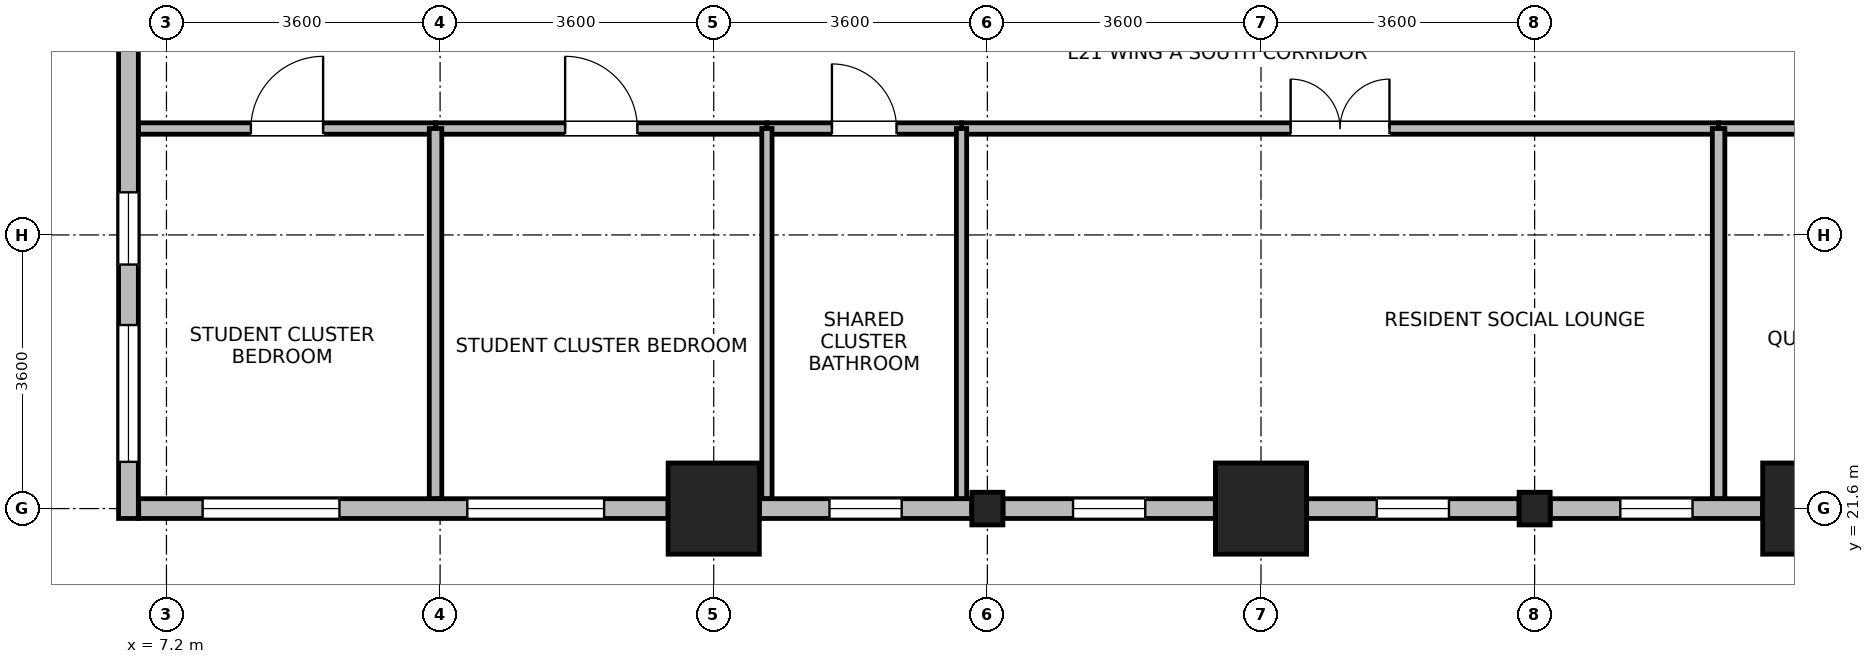
"""IFC4 building model, lengths in metres.
Left out: names, types, materials, properties, quantities, classifications, styles, units other than length and angle.
Written with IfcOpenShell. Run it as: python <this file> out.ifc"""

import sys

from ifc_helpers import new_model, si_unit, direction, frame, frame_2d, origin, origin_2d, place, context, subcontext, project, spatial, rectangle, i_section, extrude, source, transform, mapped, element, fill, save


model = new_model("IFC4")
c1 = context("Model", 3, precision=1e-05, world=origin(), true_north=direction((0.0, 1.0)))
c2 = subcontext(c1, "Body", "Model", "MODEL_VIEW")
j1 = project(units=[si_unit("LENGTHUNIT", "METRE"), si_unit("PLANEANGLEUNIT", "RADIAN")], contexts=[c1])
p1 = place(None, origin())
s1 = spatial("IfcSite", under=j1, at=p1, CompositionType="ELEMENT")
p2 = place(p1, origin())
s2 = spatial("IfcBuilding", under=s1, at=p2, CompositionType="ELEMENT")
p3 = place(p2, frame((0.0, 0.0, 86.0)))
s3 = spatial("IfcBuildingStorey", under=s2, at=p3, CompositionType="ELEMENT", Elevation=86.0)
m1 = source(origin(), c2, "Body", "SweptSolid", [
    extrude(rectangle(XDim=1.2, YDim=1.2, at=origin_2d()), origin(), (0.0, 0.0, 1.0), 3.7),
])
for number, where, z_axis, x_axis in (
    (1, (14.4, 21.6, 0.0), (0.0, 0.0, 1.0), (1.0, 0.0, 0.0)),
    (2, (21.6, 21.6, 0.0), (0.0, 0.0, 1.0), (1.0, 0.0, 0.0)),
    (3, (28.8, 21.6, 0.0), (0.0, 0.0, 1.0), (1.0, 0.0, 0.0)),
):
    element("IfcColumn", number, at=place(p3, frame(where, z_axis=z_axis, x_axis=x_axis)), inside=s3, PredefinedType="COLUMN", context=c2, shape_type="MappedRepresentation", body=[
        mapped(m1, transform((0.0, 0.0, 0.0), x_axis=(1.0, 0.0, 0.0), y_axis=(0.0, 1.0, 0.0), z_axis=(0.0, 0.0, 1.0), scale=1.0)),
    ])
m2 = source(origin(), c2, "Body", "SweptSolid", [
    extrude(i_section(OverallWidth=0.409, OverallDepth=0.43, WebThickness=0.024, FlangeThickness=0.033, FilletRadius=0.015, at=origin_2d()), origin(), (0.0, 0.0, 1.0), 3.7),
])
for number, where, z_axis, x_axis in (
    (4, (18.0, 21.6, 0.0), (0.0, 0.0, 1.0), (1.0, 0.0, 0.0)),
    (5, (25.2, 21.6, 0.0), (0.0, 0.0, 1.0), (1.0, 0.0, 0.0)),
):
    element("IfcColumn", number, at=place(p3, frame(where, z_axis=z_axis, x_axis=x_axis)), inside=s3, PredefinedType="COLUMN", context=c2, shape_type="MappedRepresentation", body=[
        mapped(m2, transform((0.0, 0.0, 0.0), x_axis=(1.0, 0.0, 0.0), y_axis=(0.0, 1.0, 0.0), z_axis=(0.0, 0.0, 1.0), scale=1.0)),
    ])
p4 = place(p3, frame((6.7, 21.47, 0.0), z_axis=(0.0, 0.0, 1.0), x_axis=(0.0, 1.0, 0.0)))
e6 = element("IfcWall", 6, at=p4, inside=s3, PredefinedType="STANDARD", context=c2, shape_type="SweptSolid", body=[
    extrude(rectangle(XDim=6.579, YDim=0.26, at=frame_2d((3.29, 0.0))), origin(), (0.0, 0.0, 1.0), 3.43),
])
p5 = place(p4, frame((0.745, 0.0, 0.85)))
e7 = element("IfcOpeningElement", 7, at=p5, cuts=e6, PredefinedType="OPENING", context=c2, shape_type="SweptSolid", body=[
    extrude(rectangle(XDim=1.8, YDim=1.85, at=frame_2d((0.9, 0.925))), frame((0.0, 0.14, 0.0), z_axis=(0.0, -1.0, 0.0), x_axis=(1.0, 0.0, 0.0)), (0.0, 0.0, 1.0), 0.28),
])
p6 = place(p4, frame((3.341, 0.0, 0.85)))
e8 = element("IfcOpeningElement", 8, at=p6, cuts=e6, PredefinedType="OPENING", context=c2, shape_type="SweptSolid", body=[
    extrude(rectangle(XDim=0.95, YDim=1.75, at=frame_2d((0.475, 0.875))), frame((0.0, 0.14, 0.0), z_axis=(0.0, -1.0, 0.0), x_axis=(1.0, 0.0, 0.0)), (0.0, 0.0, 1.0), 0.28),
])
p7 = place(p3, frame((13.799, 21.6, 0.0), z_axis=(0.0, 0.0, 1.0), x_axis=(-1.0, 0.0, 0.0)))
e9 = element("IfcWall", 9, at=p7, inside=s3, PredefinedType="STANDARD", context=c2, shape_type="SweptSolid", body=[
    extrude(rectangle(XDim=6.964, YDim=0.26, at=frame_2d((3.482, 0.0))), origin(), (0.0, 0.0, 1.0), 3.43),
])
p8 = place(p7, frame((0.841, 0.0, 0.85)))
e10 = element("IfcOpeningElement", 10, at=p8, cuts=e9, PredefinedType="OPENING", context=c2, shape_type="SweptSolid", body=[
    extrude(rectangle(XDim=1.8, YDim=1.85, at=frame_2d((0.9, 0.925))), frame((0.0, 0.14, 0.0), z_axis=(0.0, -1.0, 0.0), x_axis=(1.0, 0.0, 0.0)), (0.0, 0.0, 1.0), 0.28),
])
p9 = place(p7, frame((4.323, 0.0, 0.85)))
e11 = element("IfcOpeningElement", 11, at=p9, cuts=e9, PredefinedType="OPENING", context=c2, shape_type="SweptSolid", body=[
    extrude(rectangle(XDim=1.8, YDim=1.85, at=frame_2d((0.9, 0.925))), frame((0.0, 0.14, 0.0), z_axis=(0.0, -1.0, 0.0), x_axis=(1.0, 0.0, 0.0)), (0.0, 0.0, 1.0), 0.28),
])
p10 = place(p3, frame((17.794, 21.6, 0.0), z_axis=(0.0, 0.0, 1.0), x_axis=(-1.0, 0.0, 0.0)))
e12 = element("IfcWall", 12, at=p10, inside=s3, PredefinedType="STANDARD", context=c2, shape_type="SweptSolid", body=[
    extrude(rectangle(XDim=2.793, YDim=0.26, at=frame_2d((1.397, 0.0))), origin(), (0.0, 0.0, 1.0), 2.93),
])
p11 = place(p10, frame((0.922, 0.0, 0.85)))
e13 = element("IfcOpeningElement", 13, at=p11, cuts=e12, PredefinedType="OPENING", context=c2, shape_type="SweptSolid", body=[
    extrude(rectangle(XDim=0.95, YDim=1.75, at=frame_2d((0.475, 0.875))), frame((0.0, 0.14, 0.0), z_axis=(0.0, -1.0, 0.0), x_axis=(1.0, 0.0, 0.0)), (0.0, 0.0, 1.0), 0.28),
])
p12 = place(p3, frame((20.999, 21.6, 0.0), z_axis=(0.0, 0.0, 1.0), x_axis=(-1.0, 0.0, 0.0)))
e14 = element("IfcWall", 14, at=p12, inside=s3, PredefinedType="STANDARD", context=c2, shape_type="SweptSolid", body=[
    extrude(rectangle(XDim=2.793, YDim=0.26, at=frame_2d((1.397, 0.0))), origin(), (0.0, 0.0, 1.0), 2.93),
])
p13 = place(p12, frame((0.922, 0.0, 0.85)))
e15 = element("IfcOpeningElement", 15, at=p13, cuts=e14, PredefinedType="OPENING", context=c2, shape_type="SweptSolid", body=[
    extrude(rectangle(XDim=0.95, YDim=1.75, at=frame_2d((0.475, 0.875))), frame((0.0, 0.14, 0.0), z_axis=(0.0, -1.0, 0.0), x_axis=(1.0, 0.0, 0.0)), (0.0, 0.0, 1.0), 0.28),
])
p14 = place(p3, frame((24.994, 21.6, 0.0), z_axis=(0.0, 0.0, 1.0), x_axis=(-1.0, 0.0, 0.0)))
e16 = element("IfcWall", 16, at=p14, inside=s3, PredefinedType="STANDARD", context=c2, shape_type="SweptSolid", body=[
    extrude(rectangle(XDim=2.793, YDim=0.26, at=frame_2d((1.397, 0.0))), origin(), (0.0, 0.0, 1.0), 2.93),
])
p15 = place(p14, frame((0.922, 0.0, 0.85)))
e17 = element("IfcOpeningElement", 17, at=p15, cuts=e16, PredefinedType="OPENING", context=c2, shape_type="SweptSolid", body=[
    extrude(rectangle(XDim=0.95, YDim=1.75, at=frame_2d((0.475, 0.875))), frame((0.0, 0.14, 0.0), z_axis=(0.0, -1.0, 0.0), x_axis=(1.0, 0.0, 0.0)), (0.0, 0.0, 1.0), 0.28),
])
p16 = place(p3, frame((28.199, 21.6, 0.0), z_axis=(0.0, 0.0, 1.0), x_axis=(-1.0, 0.0, 0.0)))
e18 = element("IfcWall", 18, at=p16, inside=s3, PredefinedType="STANDARD", context=c2, shape_type="SweptSolid", body=[
    extrude(rectangle(XDim=2.793, YDim=0.26, at=frame_2d((1.397, 0.0))), origin(), (0.0, 0.0, 1.0), 2.93),
])
p17 = place(p16, frame((0.922, 0.0, 0.85)))
e19 = element("IfcOpeningElement", 19, at=p17, cuts=e18, PredefinedType="OPENING", context=c2, shape_type="SweptSolid", body=[
    extrude(rectangle(XDim=0.95, YDim=1.75, at=frame_2d((0.475, 0.875))), frame((0.0, 0.14, 0.0), z_axis=(0.0, -1.0, 0.0), x_axis=(1.0, 0.0, 0.0)), (0.0, 0.0, 1.0), 0.28),
])
p18 = place(p3, frame((17.66, 26.6, 0.0), z_axis=(0.0, 0.0, 1.0), x_axis=(1.0, 0.0, 0.0)))
e20 = element("IfcWall", 20, at=p18, inside=s3, PredefinedType="PARTITIONING", context=c2, shape_type="SweptSolid", body=[
    extrude(rectangle(XDim=9.96, YDim=0.15, at=frame_2d((4.98, 0.0))), origin(), (0.0, 0.0, 1.0), 3.43),
])
p19 = place(p18, frame((4.33, 0.0, 0.0)))
e21 = element("IfcOpeningElement", 21, at=p19, cuts=e20, PredefinedType="OPENING", context=c2, shape_type="SweptSolid", body=[
    extrude(rectangle(XDim=1.3, YDim=2.12, at=frame_2d((0.65, 1.06))), frame((0.0, 0.085, 0.0), z_axis=(0.0, -1.0, 0.0), x_axis=(1.0, 0.0, 0.0)), (0.0, 0.0, 1.0), 0.17),
])
p20 = place(p3, frame((27.62, 26.6, 0.0), z_axis=(0.0, 0.0, 1.0), x_axis=(1.0, 0.0, 0.0)))
e22 = element("IfcWall", 22, at=p20, inside=s3, PredefinedType="PARTITIONING", context=c2, shape_type="SweptSolid", body=[
    extrude(rectangle(XDim=5.74, YDim=0.15, at=frame_2d((2.87, 0.0))), origin(), (0.0, 0.0, 1.0), 3.43),
])
p21 = place(p20, frame((2.22, 0.0, 0.0)))
e23 = element("IfcOpeningElement", 23, at=p21, cuts=e22, PredefinedType="OPENING", context=c2, shape_type="SweptSolid", body=[
    extrude(rectangle(XDim=1.3, YDim=2.12, at=frame_2d((0.65, 1.06))), frame((0.0, 0.085, 0.0), z_axis=(0.0, -1.0, 0.0), x_axis=(1.0, 0.0, 0.0)), (0.0, 0.0, 1.0), 0.17),
])
p22 = place(p3, frame((10.74, 26.6, 0.0), z_axis=(0.0, 0.0, 1.0), x_axis=(1.0, 0.0, 0.0)))
e24 = element("IfcWall", 24, at=p22, inside=s3, PredefinedType="PARTITIONING", context=c2, shape_type="SweptSolid", body=[
    extrude(rectangle(XDim=4.36, YDim=0.15, at=frame_2d((2.18, 0.0))), origin(), (0.0, 0.0, 1.0), 3.43),
])
p23 = place(p22, frame((1.705, 0.0, 0.0)))
e25 = element("IfcOpeningElement", 25, at=p23, cuts=e24, PredefinedType="OPENING", context=c2, shape_type="SweptSolid", body=[
    extrude(rectangle(XDim=0.95, YDim=2.1, at=frame_2d((0.475, 1.05))), frame((0.0, 0.085, 0.0), z_axis=(0.0, -1.0, 0.0), x_axis=(1.0, 0.0, 0.0)), (0.0, 0.0, 1.0), 0.17),
])
p24 = place(p3, frame((6.832, 26.6, 0.0), z_axis=(0.0, 0.0, 1.0), x_axis=(1.0, 0.0, 0.0)))
e26 = element("IfcWall", 26, at=p24, inside=s3, PredefinedType="PARTITIONING", context=c2, shape_type="SweptSolid", body=[
    extrude(rectangle(XDim=3.908, YDim=0.15, at=frame_2d((1.954, 0.0))), origin(), (0.0, 0.0, 1.0), 3.43),
])
p25 = place(p24, frame((1.479, 0.0, 0.0)))
e27 = element("IfcOpeningElement", 27, at=p25, cuts=e26, PredefinedType="OPENING", context=c2, shape_type="SweptSolid", body=[
    extrude(rectangle(XDim=0.95, YDim=2.1, at=frame_2d((0.475, 1.05))), frame((0.0, 0.085, 0.0), z_axis=(0.0, -1.0, 0.0), x_axis=(1.0, 0.0, 0.0)), (0.0, 0.0, 1.0), 0.17),
])
p26 = place(p3, frame((15.1, 26.6, 0.0), z_axis=(0.0, 0.0, 1.0), x_axis=(1.0, 0.0, 0.0)))
e28 = element("IfcWall", 28, at=p26, inside=s3, PredefinedType="PARTITIONING", context=c2, shape_type="SweptSolid", body=[
    extrude(rectangle(XDim=2.56, YDim=0.15, at=frame_2d((1.28, 0.0))), origin(), (0.0, 0.0, 1.0), 3.43),
])
p27 = place(p26, frame((0.855, 0.0, 0.0)))
e29 = element("IfcOpeningElement", 29, at=p27, cuts=e28, PredefinedType="OPENING", context=c2, shape_type="SweptSolid", body=[
    extrude(rectangle(XDim=0.85, YDim=2.04, at=frame_2d((0.425, 1.02))), frame((0.0, 0.085, 0.0), z_axis=(0.0, -1.0, 0.0), x_axis=(1.0, 0.0, 0.0)), (0.0, 0.0, 1.0), 0.17),
])
p28 = place(p3, frame((10.74, 21.732, 0.0), z_axis=(0.0, 0.0, 1.0), x_axis=(0.0, 1.0, 0.0)))
e30 = element("IfcWall", 30, at=p28, inside=s3, PredefinedType="PARTITIONING", context=c2, shape_type="SweptSolid", body=[
    extrude(rectangle(XDim=4.868, YDim=0.165, at=frame_2d((2.434, 0.0))), origin(), (0.0, 0.0, 1.0), 3.43),
])
for number, where, z_axis, x_axis in (
    (31, (15.1, 21.732, 0.0), (0.0, 0.0, 1.0), (0.0, 1.0, 0.0)),
    (32, (17.66, 21.732, 0.0), (0.0, 0.0, 1.0), (0.0, 1.0, 0.0)),
):
    element("IfcWall", number, at=place(p3, frame(where, z_axis=z_axis, x_axis=x_axis)), inside=s3, PredefinedType="PARTITIONING", context=c2, shape_type="SweptSolid", body=[
        extrude(rectangle(XDim=4.868, YDim=0.135, at=frame_2d((2.434, 0.0))), origin(), (0.0, 0.0, 1.0), 3.43),
    ])
p29 = place(p3, frame((27.62, 21.732, 0.0), z_axis=(0.0, 0.0, 1.0), x_axis=(0.0, 1.0, 0.0)))
e33 = element("IfcWall", 33, at=p29, inside=s3, PredefinedType="PARTITIONING", context=c2, shape_type="SweptSolid", body=[
    extrude(rectangle(XDim=4.868, YDim=0.165, at=frame_2d((2.434, 0.0))), origin(), (0.0, 0.0, 1.0), 3.43),
])
p30 = place(p5, origin())
e34 = element("IfcWindow", 34, at=p30, inside=s3, PartitioningType="SINGLE_PANEL", PredefinedType="WINDOW", context=c2, shape_type="SweptSolid", body=[
    extrude(rectangle(XDim=1.8, YDim=1.85, at=frame_2d((0.9, 0.925))), frame((0.0, 0.03, 0.0), z_axis=(0.0, -1.0, 0.0), x_axis=(1.0, 0.0, 0.0)), (0.0, 0.0, 1.0), 0.06),
])
fill(e7, e34)
p31 = place(p6, origin())
e35 = element("IfcWindow", 35, at=p31, inside=s3, PartitioningType="SINGLE_PANEL", PredefinedType="WINDOW", context=c2, shape_type="SweptSolid", body=[
    extrude(rectangle(XDim=0.95, YDim=1.75, at=frame_2d((0.475, 0.875))), frame((0.0, 0.03, 0.0), z_axis=(0.0, -1.0, 0.0), x_axis=(1.0, 0.0, 0.0)), (0.0, 0.0, 1.0), 0.06),
])
fill(e8, e35)
p32 = place(p8, origin())
e36 = element("IfcWindow", 36, at=p32, inside=s3, PartitioningType="SINGLE_PANEL", PredefinedType="WINDOW", context=c2, shape_type="SweptSolid", body=[
    extrude(rectangle(XDim=1.8, YDim=1.85, at=frame_2d((0.9, 0.925))), frame((0.0, 0.03, 0.0), z_axis=(0.0, -1.0, 0.0), x_axis=(1.0, 0.0, 0.0)), (0.0, 0.0, 1.0), 0.06),
])
fill(e10, e36)
p33 = place(p9, origin())
e37 = element("IfcWindow", 37, at=p33, inside=s3, PartitioningType="SINGLE_PANEL", PredefinedType="WINDOW", context=c2, shape_type="SweptSolid", body=[
    extrude(rectangle(XDim=1.8, YDim=1.85, at=frame_2d((0.9, 0.925))), frame((0.0, 0.03, 0.0), z_axis=(0.0, -1.0, 0.0), x_axis=(1.0, 0.0, 0.0)), (0.0, 0.0, 1.0), 0.06),
])
fill(e11, e37)
p34 = place(p11, origin())
e38 = element("IfcWindow", 38, at=p34, inside=s3, PartitioningType="SINGLE_PANEL", PredefinedType="WINDOW", context=c2, shape_type="SweptSolid", body=[
    extrude(rectangle(XDim=0.95, YDim=1.75, at=frame_2d((0.475, 0.875))), frame((0.0, 0.03, 0.0), z_axis=(0.0, -1.0, 0.0), x_axis=(1.0, 0.0, 0.0)), (0.0, 0.0, 1.0), 0.06),
])
fill(e13, e38)
p35 = place(p13, origin())
e39 = element("IfcWindow", 39, at=p35, inside=s3, PartitioningType="SINGLE_PANEL", PredefinedType="WINDOW", context=c2, shape_type="SweptSolid", body=[
    extrude(rectangle(XDim=0.95, YDim=1.75, at=frame_2d((0.475, 0.875))), frame((0.0, 0.03, 0.0), z_axis=(0.0, -1.0, 0.0), x_axis=(1.0, 0.0, 0.0)), (0.0, 0.0, 1.0), 0.06),
])
fill(e15, e39)
p36 = place(p15, origin())
e40 = element("IfcWindow", 40, at=p36, inside=s3, PartitioningType="SINGLE_PANEL", PredefinedType="WINDOW", context=c2, shape_type="SweptSolid", body=[
    extrude(rectangle(XDim=0.95, YDim=1.75, at=frame_2d((0.475, 0.875))), frame((0.0, 0.03, 0.0), z_axis=(0.0, -1.0, 0.0), x_axis=(1.0, 0.0, 0.0)), (0.0, 0.0, 1.0), 0.06),
])
fill(e17, e40)
p37 = place(p17, origin())
e41 = element("IfcWindow", 41, at=p37, inside=s3, PartitioningType="SINGLE_PANEL", PredefinedType="WINDOW", context=c2, shape_type="SweptSolid", body=[
    extrude(rectangle(XDim=0.95, YDim=1.75, at=frame_2d((0.475, 0.875))), frame((0.0, 0.03, 0.0), z_axis=(0.0, -1.0, 0.0), x_axis=(1.0, 0.0, 0.0)), (0.0, 0.0, 1.0), 0.06),
])
fill(e19, e41)
p38 = place(p19, origin())
e42 = element("IfcDoor", 42, at=p38, inside=s3, OperationType="DOUBLE_DOOR_SINGLE_SWING", PredefinedType="DOOR", context=c2, shape_type="SweptSolid", body=[
    extrude(rectangle(XDim=1.3, YDim=2.12, at=frame_2d((0.65, 1.06))), frame((0.0, 0.025, 0.0), z_axis=(0.0, -1.0, 0.0), x_axis=(1.0, 0.0, 0.0)), (0.0, 0.0, 1.0), 0.05),
])
fill(e21, e42)
p39 = place(p23, origin())
e43 = element("IfcDoor", 43, at=p39, inside=s3, OperationType="SINGLE_SWING_LEFT", PredefinedType="DOOR", context=c2, shape_type="SweptSolid", body=[
    extrude(rectangle(XDim=0.95, YDim=2.1, at=frame_2d((0.475, 1.05))), frame((0.0, 0.025, 0.0), z_axis=(0.0, -1.0, 0.0), x_axis=(1.0, 0.0, 0.0)), (0.0, 0.0, 1.0), 0.05),
])
fill(e25, e43)
p40 = place(p25, origin())
e44 = element("IfcDoor", 44, at=p40, inside=s3, OperationType="SINGLE_SWING_RIGHT", PredefinedType="DOOR", context=c2, shape_type="SweptSolid", body=[
    extrude(rectangle(XDim=0.95, YDim=2.1, at=frame_2d((0.475, 1.05))), frame((0.0, 0.025, 0.0), z_axis=(0.0, -1.0, 0.0), x_axis=(1.0, 0.0, 0.0)), (0.0, 0.0, 1.0), 0.05),
])
fill(e27, e44)
p41 = place(p27, origin())
e45 = element("IfcDoor", 45, at=p41, inside=s3, OperationType="SINGLE_SWING_LEFT", PredefinedType="DOOR", context=c2, shape_type="SweptSolid", body=[
    extrude(rectangle(XDim=0.85, YDim=2.04, at=frame_2d((0.425, 1.02))), frame((0.0, 0.025, 0.0), z_axis=(0.0, -1.0, 0.0), x_axis=(1.0, 0.0, 0.0)), (0.0, 0.0, 1.0), 0.05),
])
fill(e29, e45)
save(model, sys.argv[1])
